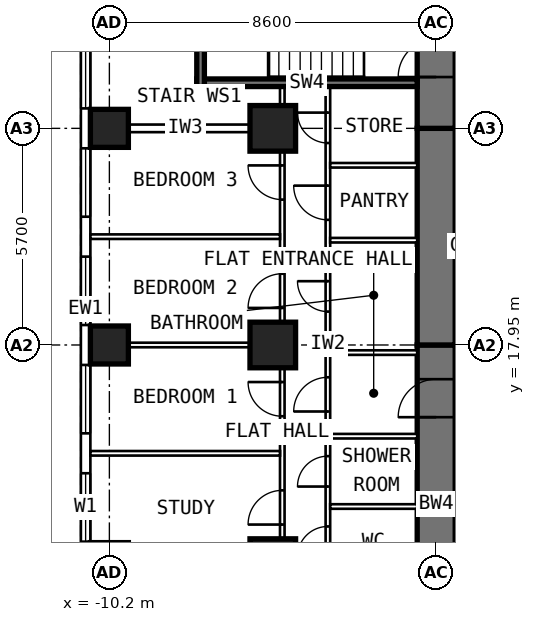
"""IFC4 building model, lengths in metres.
Left out: names, types, materials, properties, quantities, classifications, styles, units other than length and angle.
Written with IfcOpenShell. Run it as: python <this file> out.ifc"""

import sys

from ifc_helpers import new_model, si_unit, direction, frame, frame_2d, origin, origin_2d, place, context, subcontext, project, spatial, rectangle, extrude, element, fill, save


model = new_model("IFC4")
c1 = context("Model", 3, precision=1e-05, world=origin(), true_north=direction((0.0, 1.0)))
c2 = subcontext(c1, "Body", "Model", "MODEL_VIEW")
j1 = project(units=[si_unit("LENGTHUNIT", "METRE"), si_unit("PLANEANGLEUNIT", "RADIAN")], contexts=[c1])
p1 = place(None, origin())
s1 = spatial("IfcSite", under=j1, at=p1, CompositionType="ELEMENT")
p2 = place(p1, origin())
s2 = spatial("IfcBuilding", under=s1, at=p2, CompositionType="ELEMENT")
p3 = place(p2, frame((0.0, 0.0, 68.2)))
s3 = spatial("IfcBuildingStorey", under=s2, at=p3, CompositionType="ELEMENT", Elevation=68.2)
for number, where, z_axis, x_axis in (
    (1, (-10.2, 17.95, 0.0), (0.0, 0.0, 1.0), (0.0, 1.0, 0.0)),
    (2, (-10.2, 23.65, 0.0), (0.0, 0.0, 1.0), (0.0, 1.0, 0.0)),
):
    element("IfcColumn", number, at=place(p3, frame(where, z_axis=z_axis, x_axis=x_axis)), inside=s3, PredefinedType="COLUMN", context=c2, shape_type="SweptSolid", body=[
        extrude(rectangle(XDim=1.0, YDim=1.0, at=origin_2d()), origin(), (0.0, 0.0, 1.0), 3.6),
    ])
for number, where, z_axis, x_axis in (
    (3, (-5.9, 12.25, 0.0), (0.0, 0.0, 1.0), (0.0, 1.0, 0.0)),
    (4, (-5.9, 17.95, 0.0), (0.0, 0.0, 1.0), (0.0, 1.0, 0.0)),
    (5, (-5.9, 23.65, 0.0), (0.0, 0.0, 1.0), (0.0, 1.0, 0.0)),
):
    element("IfcColumn", number, at=place(p3, frame(where, z_axis=z_axis, x_axis=x_axis)), inside=s3, PredefinedType="COLUMN", context=c2, shape_type="SweptSolid", body=[
        extrude(rectangle(XDim=1.2, YDim=1.2, at=origin_2d()), origin(), (0.0, 0.0, 1.0), 3.6),
    ])
p4 = place(p3, frame((-1.6, 9.6, 0.0), z_axis=(0.0, 0.0, 1.0), x_axis=(0.0, 1.0, 0.0)))
e6 = element("IfcWall", 6, at=p4, inside=s3, PredefinedType="SHEAR", context=c2, shape_type="SweptSolid", body=[
    extrude(rectangle(XDim=8.35, YDim=1.0, at=frame_2d((4.175, 0.0))), origin(), (0.0, 0.0, 1.0), 3.6),
])
p5 = place(p4, frame((6.45, 0.0, 0.0)))
e7 = element("IfcOpeningElement", 7, at=p5, cuts=e6, PredefinedType="OPENING", context=c2, shape_type="SweptSolid", body=[
    extrude(rectangle(XDim=1.0, YDim=2.1, at=frame_2d((0.5, 1.05))), frame((0.0, 0.512, 0.0), z_axis=(0.0, -1.0, 0.0), x_axis=(1.0, 0.0, 0.0)), (0.0, 0.0, 1.0), 1.024),
])
p6 = place(p3, frame((-1.6, 17.95, 0.0), z_axis=(0.0, 0.0, 1.0), x_axis=(0.0, 1.0, 0.0)))
e8 = element("IfcWall", 8, at=p6, inside=s3, PredefinedType="SHEAR", context=c2, shape_type="SweptSolid", body=[
    extrude(rectangle(XDim=5.7, YDim=1.0, at=frame_2d((2.85, 0.0))), origin(), (0.0, 0.0, 1.0), 3.6),
])
p7 = place(p3, frame((-1.6, 23.65, 0.0), z_axis=(0.0, 0.0, 1.0), x_axis=(0.0, 1.0, 0.0)))
e9 = element("IfcWall", 9, at=p7, inside=s3, PredefinedType="SHEAR", context=c2, shape_type="SweptSolid", body=[
    extrude(rectangle(XDim=10.745, YDim=1.0, at=frame_2d((5.373, 0.0))), origin(), (0.0, 0.0, 1.0), 3.6),
])
p8 = place(p7, frame((6.1, 0.0, 0.0)))
e10 = element("IfcOpeningElement", 10, at=p8, cuts=e9, PredefinedType="OPENING", context=c2, shape_type="SweptSolid", body=[
    extrude(rectangle(XDim=1.0, YDim=2.1, at=frame_2d((0.5, 1.05))), frame((0.0, 0.512, 0.0), z_axis=(0.0, -1.0, 0.0), x_axis=(1.0, 0.0, 0.0)), (0.0, 0.0, 1.0), 1.024),
])
p9 = place(p7, frame((1.35, 0.0, 0.0)))
e11 = element("IfcOpeningElement", 11, at=p9, cuts=e9, PredefinedType="OPENING", context=c2, shape_type="SweptSolid", body=[
    extrude(rectangle(XDim=1.0, YDim=2.1, at=frame_2d((0.5, 1.05))), frame((0.0, 0.512, 0.0), z_axis=(0.0, -1.0, 0.0), x_axis=(1.0, 0.0, 0.0)), (0.0, 0.0, 1.0), 1.024),
])
p10 = place(p3, frame((-10.825, 6.148, 0.0), z_axis=(0.0, 0.0, 1.0), x_axis=(0.0, 1.0, 0.0)))
e12 = element("IfcWall", 12, at=p10, inside=s3, PredefinedType="SOLIDWALL", context=c2, shape_type="SweptSolid", body=[
    extrude(rectangle(XDim=25.487, YDim=0.25, at=frame_2d((12.744, 0.0))), origin(), (0.0, 0.0, 1.0), 3.35),
])
p11 = place(p10, frame((0.927, 0.0, 0.8)))
e13 = element("IfcOpeningElement", 13, at=p11, cuts=e12, PredefinedType="OPENING", context=c2, shape_type="SweptSolid", body=[
    extrude(rectangle(XDim=1.8, YDim=1.8, at=frame_2d((0.9, 0.9))), frame((0.0, 0.137, 0.0), z_axis=(0.0, -1.0, 0.0), x_axis=(1.0, 0.0, 0.0)), (0.0, 0.0, 1.0), 0.274),
])
p12 = place(p10, frame((3.777, 0.0, 0.8)))
e14 = element("IfcOpeningElement", 14, at=p12, cuts=e12, PredefinedType="OPENING", context=c2, shape_type="SweptSolid", body=[
    extrude(rectangle(XDim=1.8, YDim=1.8, at=frame_2d((0.9, 0.9))), frame((0.0, 0.137, 0.0), z_axis=(0.0, -1.0, 0.0), x_axis=(1.0, 0.0, 0.0)), (0.0, 0.0, 1.0), 0.274),
])
p13 = place(p10, frame((6.627, 0.0, 0.8)))
e15 = element("IfcOpeningElement", 15, at=p13, cuts=e12, PredefinedType="OPENING", context=c2, shape_type="SweptSolid", body=[
    extrude(rectangle(XDim=1.8, YDim=1.8, at=frame_2d((0.9, 0.9))), frame((0.0, 0.137, 0.0), z_axis=(0.0, -1.0, 0.0), x_axis=(1.0, 0.0, 0.0)), (0.0, 0.0, 1.0), 0.274),
])
p14 = place(p10, frame((9.477, 0.0, 0.8)))
e16 = element("IfcOpeningElement", 16, at=p14, cuts=e12, PredefinedType="OPENING", context=c2, shape_type="SweptSolid", body=[
    extrude(rectangle(XDim=1.8, YDim=1.8, at=frame_2d((0.9, 0.9))), frame((0.0, 0.137, 0.0), z_axis=(0.0, -1.0, 0.0), x_axis=(1.0, 0.0, 0.0)), (0.0, 0.0, 1.0), 0.274),
])
p15 = place(p10, frame((12.327, 0.0, 0.8)))
e17 = element("IfcOpeningElement", 17, at=p15, cuts=e12, PredefinedType="OPENING", context=c2, shape_type="SweptSolid", body=[
    extrude(rectangle(XDim=1.8, YDim=1.8, at=frame_2d((0.9, 0.9))), frame((0.0, 0.137, 0.0), z_axis=(0.0, -1.0, 0.0), x_axis=(1.0, 0.0, 0.0)), (0.0, 0.0, 1.0), 0.274),
])
p16 = place(p10, frame((15.177, 0.0, 0.8)))
e18 = element("IfcOpeningElement", 18, at=p16, cuts=e12, PredefinedType="OPENING", context=c2, shape_type="SweptSolid", body=[
    extrude(rectangle(XDim=1.8, YDim=1.8, at=frame_2d((0.9, 0.9))), frame((0.0, 0.137, 0.0), z_axis=(0.0, -1.0, 0.0), x_axis=(1.0, 0.0, 0.0)), (0.0, 0.0, 1.0), 0.274),
])
p17 = place(p10, frame((18.027, 0.0, 0.8)))
e19 = element("IfcOpeningElement", 19, at=p17, cuts=e12, PredefinedType="OPENING", context=c2, shape_type="SweptSolid", body=[
    extrude(rectangle(XDim=1.8, YDim=1.8, at=frame_2d((0.9, 0.9))), frame((0.0, 0.137, 0.0), z_axis=(0.0, -1.0, 0.0), x_axis=(1.0, 0.0, 0.0)), (0.0, 0.0, 1.0), 0.274),
])
p18 = place(p10, frame((20.877, 0.0, 0.8)))
e20 = element("IfcOpeningElement", 20, at=p18, cuts=e12, PredefinedType="OPENING", context=c2, shape_type="SweptSolid", body=[
    extrude(rectangle(XDim=1.8, YDim=1.8, at=frame_2d((0.9, 0.9))), frame((0.0, 0.137, 0.0), z_axis=(0.0, -1.0, 0.0), x_axis=(1.0, 0.0, 0.0)), (0.0, 0.0, 1.0), 0.274),
])
p19 = place(p3, frame((-4.45, 10.1, 0.0), z_axis=(0.0, 0.0, 1.0), x_axis=(0.0, 1.0, 0.0)))
e21 = element("IfcWall", 21, at=p19, inside=s3, PredefinedType="PARTITIONING", context=c2, shape_type="SweptSolid", body=[
    extrude(rectangle(XDim=14.65, YDim=0.12, at=frame_2d((7.325, 0.0))), origin(), (0.0, 0.0, 1.0), 3.35),
])
p20 = place(p19, frame((0.375, 0.0, 0.0)))
e22 = element("IfcOpeningElement", 22, at=p20, cuts=e21, PredefinedType="OPENING", context=c2, shape_type="SweptSolid", body=[
    extrude(rectangle(XDim=0.9, YDim=2.1, at=frame_2d((0.45, 1.05))), frame((0.0, 0.072, 0.0), z_axis=(0.0, -1.0, 0.0), x_axis=(1.0, 0.0, 0.0)), (0.0, 0.0, 1.0), 0.144),
])
p21 = place(p19, frame((2.275, 0.0, 0.0)))
e23 = element("IfcOpeningElement", 23, at=p21, cuts=e21, PredefinedType="OPENING", context=c2, shape_type="SweptSolid", body=[
    extrude(rectangle(XDim=0.8, YDim=2.1, at=frame_2d((0.4, 1.05))), frame((0.0, 0.072, 0.0), z_axis=(0.0, -1.0, 0.0), x_axis=(1.0, 0.0, 0.0)), (0.0, 0.0, 1.0), 0.144),
])
p22 = place(p19, frame((4.125, 0.0, 0.0)))
e24 = element("IfcOpeningElement", 24, at=p22, cuts=e21, PredefinedType="OPENING", context=c2, shape_type="SweptSolid", body=[
    extrude(rectangle(XDim=0.8, YDim=2.1, at=frame_2d((0.4, 1.05))), frame((0.0, 0.072, 0.0), z_axis=(0.0, -1.0, 0.0), x_axis=(1.0, 0.0, 0.0)), (0.0, 0.0, 1.0), 0.144),
])
p23 = place(p19, frame((6.1, 0.0, 0.0)))
e25 = element("IfcOpeningElement", 25, at=p23, cuts=e21, PredefinedType="OPENING", context=c2, shape_type="SweptSolid", body=[
    extrude(rectangle(XDim=0.9, YDim=2.1, at=frame_2d((0.45, 1.05))), frame((0.0, 0.072, 0.0), z_axis=(0.0, -1.0, 0.0), x_axis=(1.0, 0.0, 0.0)), (0.0, 0.0, 1.0), 0.144),
])
p24 = place(p19, frame((8.729, 0.0, 0.0)))
e26 = element("IfcOpeningElement", 26, at=p24, cuts=e21, PredefinedType="OPENING", context=c2, shape_type="SweptSolid", body=[
    extrude(rectangle(XDim=0.8, YDim=2.1, at=frame_2d((0.4, 1.05))), frame((0.0, 0.072, 0.0), z_axis=(0.0, -1.0, 0.0), x_axis=(1.0, 0.0, 0.0)), (0.0, 0.0, 1.0), 0.144),
])
p25 = place(p19, frame((11.143, 0.0, 0.0)))
e27 = element("IfcOpeningElement", 27, at=p25, cuts=e21, PredefinedType="OPENING", context=c2, shape_type="SweptSolid", body=[
    extrude(rectangle(XDim=0.9, YDim=2.1, at=frame_2d((0.45, 1.05))), frame((0.0, 0.072, 0.0), z_axis=(0.0, -1.0, 0.0), x_axis=(1.0, 0.0, 0.0)), (0.0, 0.0, 1.0), 0.144),
])
p26 = place(p19, frame((13.164, 0.0, 0.0)))
e28 = element("IfcOpeningElement", 28, at=p26, cuts=e21, PredefinedType="OPENING", context=c2, shape_type="SweptSolid", body=[
    extrude(rectangle(XDim=0.8, YDim=2.1, at=frame_2d((0.4, 1.05))), frame((0.0, 0.072, 0.0), z_axis=(0.0, -1.0, 0.0), x_axis=(1.0, 0.0, 0.0)), (0.0, 0.0, 1.0), 0.144),
])
p27 = place(p3, frame((-5.65, 9.6, 0.0), z_axis=(0.0, 0.0, 1.0), x_axis=(0.0, 1.0, 0.0)))
e29 = element("IfcWall", 29, at=p27, inside=s3, PredefinedType="PARTITIONING", context=c2, shape_type="SweptSolid", body=[
    extrude(rectangle(XDim=15.15, YDim=0.12, at=frame_2d((7.575, 0.0))), origin(), (0.0, 0.0, 1.0), 3.35),
])
p28 = place(p27, frame((1.0, 0.0, 0.0)))
e30 = element("IfcOpeningElement", 30, at=p28, cuts=e29, PredefinedType="OPENING", context=c2, shape_type="SweptSolid", body=[
    extrude(rectangle(XDim=0.9, YDim=2.1, at=frame_2d((0.45, 1.05))), frame((0.0, 0.072, 0.0), z_axis=(0.0, -1.0, 0.0), x_axis=(1.0, 0.0, 0.0)), (0.0, 0.0, 1.0), 0.144),
])
p29 = place(p27, frame((3.625, 0.0, 0.0)))
e31 = element("IfcOpeningElement", 31, at=p29, cuts=e29, PredefinedType="OPENING", context=c2, shape_type="SweptSolid", body=[
    extrude(rectangle(XDim=0.9, YDim=2.1, at=frame_2d((0.45, 1.05))), frame((0.0, 0.072, 0.0), z_axis=(0.0, -1.0, 0.0), x_axis=(1.0, 0.0, 0.0)), (0.0, 0.0, 1.0), 0.144),
])
p30 = place(p27, frame((6.475, 0.0, 0.0)))
e32 = element("IfcOpeningElement", 32, at=p30, cuts=e29, PredefinedType="OPENING", context=c2, shape_type="SweptSolid", body=[
    extrude(rectangle(XDim=0.9, YDim=2.1, at=frame_2d((0.45, 1.05))), frame((0.0, 0.072, 0.0), z_axis=(0.0, -1.0, 0.0), x_axis=(1.0, 0.0, 0.0)), (0.0, 0.0, 1.0), 0.144),
])
p31 = place(p27, frame((9.325, 0.0, 0.0)))
e33 = element("IfcOpeningElement", 33, at=p31, cuts=e29, PredefinedType="OPENING", context=c2, shape_type="SweptSolid", body=[
    extrude(rectangle(XDim=0.9, YDim=2.1, at=frame_2d((0.45, 1.05))), frame((0.0, 0.072, 0.0), z_axis=(0.0, -1.0, 0.0), x_axis=(1.0, 0.0, 0.0)), (0.0, 0.0, 1.0), 0.144),
])
p32 = place(p27, frame((12.175, 0.0, 0.0)))
e34 = element("IfcOpeningElement", 34, at=p32, cuts=e29, PredefinedType="OPENING", context=c2, shape_type="SweptSolid", body=[
    extrude(rectangle(XDim=0.9, YDim=2.1, at=frame_2d((0.45, 1.05))), frame((0.0, 0.072, 0.0), z_axis=(0.0, -1.0, 0.0), x_axis=(1.0, 0.0, 0.0)), (0.0, 0.0, 1.0), 0.144),
])
p33 = place(p3, frame((-5.71, 15.1, 0.0), z_axis=(0.0, 0.0, 1.0), x_axis=(-1.0, 0.0, 0.0)))
e35 = element("IfcWall", 35, at=p33, inside=s3, PredefinedType="PARTITIONING", context=c2, shape_type="SweptSolid", body=[
    extrude(rectangle(XDim=4.99, YDim=0.12, at=frame_2d((2.495, 0.0))), origin(), (0.0, 0.0, 1.0), 3.35),
])
p34 = place(p3, frame((-5.71, 17.95, 0.0), z_axis=(0.0, 0.0, 1.0), x_axis=(-1.0, 0.0, 0.0)))
e36 = element("IfcWall", 36, at=p34, inside=s3, PredefinedType="PARTITIONING", context=c2, shape_type="SweptSolid", body=[
    extrude(rectangle(XDim=4.99, YDim=0.12, at=frame_2d((2.495, 0.0))), origin(), (0.0, 0.0, 1.0), 2.45),
])
p35 = place(p3, frame((-5.71, 20.8, 0.0), z_axis=(0.0, 0.0, 1.0), x_axis=(-1.0, 0.0, 0.0)))
e37 = element("IfcWall", 37, at=p35, inside=s3, PredefinedType="PARTITIONING", context=c2, shape_type="SweptSolid", body=[
    extrude(rectangle(XDim=4.99, YDim=0.12, at=frame_2d((2.495, 0.0))), origin(), (0.0, 0.0, 1.0), 3.35),
])
for number, where, z_axis, x_axis in (
    (38, (-2.1, 13.7, 0.0), (0.0, 0.0, 1.0), (-1.0, 0.0, 0.0)),
    (39, (-2.1, 15.55, 0.0), (0.0, 0.0, 1.0), (-1.0, 0.0, 0.0)),
):
    element("IfcWall", number, at=place(p3, frame(where, z_axis=z_axis, x_axis=x_axis)), inside=s3, PredefinedType="PARTITIONING", context=c2, shape_type="SweptSolid", body=[
        extrude(rectangle(XDim=2.29, YDim=0.12, at=frame_2d((1.145, 0.0))), origin(), (0.0, 0.0, 1.0), 3.35),
    ])
p36 = place(p3, frame((-2.1, 17.75, 0.0), z_axis=(0.0, 0.0, 1.0), x_axis=(-1.0, 0.0, 0.0)))
e40 = element("IfcWall", 40, at=p36, inside=s3, PredefinedType="PARTITIONING", context=c2, shape_type="SweptSolid", body=[
    extrude(rectangle(XDim=2.29, YDim=0.12, at=frame_2d((1.145, 0.0))), origin(), (0.0, 0.0, 1.0), 2.45),
])
for number, where, z_axis, x_axis in (
    (41, (-2.1, 20.707, 0.0), (0.0, 0.0, 1.0), (-1.0, 0.0, 0.0)),
    (42, (-2.1, 22.678, 0.0), (0.0, 0.0, 1.0), (-1.0, 0.0, 0.0)),
):
    element("IfcWall", number, at=place(p3, frame(where, z_axis=z_axis, x_axis=x_axis)), inside=s3, PredefinedType="PARTITIONING", context=c2, shape_type="SweptSolid", body=[
        extrude(rectangle(XDim=2.29, YDim=0.12, at=frame_2d((1.145, 0.0))), origin(), (0.0, 0.0, 1.0), 3.35),
    ])
p37 = place(p3, frame((-5.71, 23.65, 0.0), z_axis=(0.0, 0.0, 1.0), x_axis=(-1.0, 0.0, 0.0)))
e43 = element("IfcWall", 43, at=p37, inside=s3, PredefinedType="PARTITIONING", context=c2, shape_type="SweptSolid", body=[
    extrude(rectangle(XDim=4.99, YDim=0.2, at=frame_2d((2.495, 0.0))), origin(), (0.0, 0.0, 1.0), 2.45),
])
p38 = place(p3, frame((-2.1, 24.85, 0.0), z_axis=(0.0, 0.0, 1.0), x_axis=(-1.0, 0.0, 0.0)))
e44 = element("IfcWall", 44, at=p38, inside=s3, PredefinedType="SHEAR", context=c2, shape_type="SweptSolid", body=[
    extrude(rectangle(XDim=5.8, YDim=0.2, at=frame_2d((2.9, 0.0))), origin(), (0.0, 0.0, 1.0), 3.33),
])
p39 = place(p3, frame((-7.8, 24.75, 0.0), z_axis=(0.0, 0.0, 1.0), x_axis=(0.0, 1.0, 0.0)))
e45 = element("IfcWall", 45, at=p39, inside=s3, PredefinedType="SHEAR", context=c2, shape_type="SweptSolid", body=[
    extrude(rectangle(XDim=4.0, YDim=0.2, at=frame_2d((2.0, 0.0))), origin(), (0.0, 0.0, 1.0), 3.33),
])
p40 = place(p13, origin())
e46 = element("IfcWindow", 46, at=p40, inside=s3, PartitioningType="SINGLE_PANEL", PredefinedType="WINDOW", context=c2, shape_type="SweptSolid", body=[
    extrude(rectangle(XDim=1.8, YDim=1.8, at=frame_2d((0.9, 0.9))), frame((0.0, 0.03, 0.0), z_axis=(0.0, -1.0, 0.0), x_axis=(1.0, 0.0, 0.0)), (0.0, 0.0, 1.0), 0.06),
])
fill(e15, e46)
p41 = place(p14, origin())
e47 = element("IfcWindow", 47, at=p41, inside=s3, PartitioningType="SINGLE_PANEL", PredefinedType="WINDOW", context=c2, shape_type="SweptSolid", body=[
    extrude(rectangle(XDim=1.8, YDim=1.8, at=frame_2d((0.9, 0.9))), frame((0.0, 0.03, 0.0), z_axis=(0.0, -1.0, 0.0), x_axis=(1.0, 0.0, 0.0)), (0.0, 0.0, 1.0), 0.06),
])
fill(e16, e47)
p42 = place(p15, origin())
e48 = element("IfcWindow", 48, at=p42, inside=s3, PartitioningType="SINGLE_PANEL", PredefinedType="WINDOW", context=c2, shape_type="SweptSolid", body=[
    extrude(rectangle(XDim=1.8, YDim=1.8, at=frame_2d((0.9, 0.9))), frame((0.0, 0.03, 0.0), z_axis=(0.0, -1.0, 0.0), x_axis=(1.0, 0.0, 0.0)), (0.0, 0.0, 1.0), 0.06),
])
fill(e17, e48)
p43 = place(p16, origin())
e49 = element("IfcWindow", 49, at=p43, inside=s3, PartitioningType="SINGLE_PANEL", PredefinedType="WINDOW", context=c2, shape_type="SweptSolid", body=[
    extrude(rectangle(XDim=1.8, YDim=1.8, at=frame_2d((0.9, 0.9))), frame((0.0, 0.03, 0.0), z_axis=(0.0, -1.0, 0.0), x_axis=(1.0, 0.0, 0.0)), (0.0, 0.0, 1.0), 0.06),
])
fill(e18, e49)
p44 = place(p17, origin())
e50 = element("IfcWindow", 50, at=p44, inside=s3, PartitioningType="SINGLE_PANEL", PredefinedType="WINDOW", context=c2, shape_type="SweptSolid", body=[
    extrude(rectangle(XDim=1.8, YDim=1.8, at=frame_2d((0.9, 0.9))), frame((0.0, 0.03, 0.0), z_axis=(0.0, -1.0, 0.0), x_axis=(1.0, 0.0, 0.0)), (0.0, 0.0, 1.0), 0.06),
])
fill(e19, e50)
p45 = place(p5, origin())
e51 = element("IfcDoor", 51, at=p45, inside=s3, OperationType="SINGLE_SWING_LEFT", PredefinedType="DOOR", context=c2, shape_type="SweptSolid", body=[
    extrude(rectangle(XDim=1.0, YDim=2.1, at=frame_2d((0.5, 1.05))), frame((0.0, 0.25, 0.0), z_axis=(0.0, -1.0, 0.0), x_axis=(1.0, 0.0, 0.0)), (0.0, 0.0, 1.0), 0.5),
])
fill(e7, e51)
p46 = place(p29, origin())
e52 = element("IfcDoor", 52, at=p46, inside=s3, OperationType="SINGLE_SWING_LEFT", PredefinedType="DOOR", context=c2, shape_type="SweptSolid", body=[
    extrude(rectangle(XDim=0.9, YDim=2.1, at=frame_2d((0.45, 1.05))), frame((0.0, 0.025, 0.0), z_axis=(0.0, -1.0, 0.0), x_axis=(1.0, 0.0, 0.0)), (0.0, 0.0, 1.0), 0.05),
])
fill(e31, e52)
p47 = place(p30, origin())
e53 = element("IfcDoor", 53, at=p47, inside=s3, OperationType="SINGLE_SWING_RIGHT", PredefinedType="DOOR", context=c2, shape_type="SweptSolid", body=[
    extrude(rectangle(XDim=0.9, YDim=2.1, at=frame_2d((0.45, 1.05))), frame((0.0, 0.025, 0.0), z_axis=(0.0, -1.0, 0.0), x_axis=(1.0, 0.0, 0.0)), (0.0, 0.0, 1.0), 0.05),
])
fill(e32, e53)
p48 = place(p31, origin())
e54 = element("IfcDoor", 54, at=p48, inside=s3, OperationType="SINGLE_SWING_LEFT", PredefinedType="DOOR", context=c2, shape_type="SweptSolid", body=[
    extrude(rectangle(XDim=0.9, YDim=2.1, at=frame_2d((0.45, 1.05))), frame((0.0, 0.025, 0.0), z_axis=(0.0, -1.0, 0.0), x_axis=(1.0, 0.0, 0.0)), (0.0, 0.0, 1.0), 0.05),
])
fill(e33, e54)
p49 = place(p32, origin())
e55 = element("IfcDoor", 55, at=p49, inside=s3, OperationType="SINGLE_SWING_RIGHT", PredefinedType="DOOR", context=c2, shape_type="SweptSolid", body=[
    extrude(rectangle(XDim=0.9, YDim=2.1, at=frame_2d((0.45, 1.05))), frame((0.0, 0.025, 0.0), z_axis=(0.0, -1.0, 0.0), x_axis=(1.0, 0.0, 0.0)), (0.0, 0.0, 1.0), 0.05),
])
fill(e34, e55)
p50 = place(p21, origin())
e56 = element("IfcDoor", 56, at=p50, inside=s3, OperationType="SINGLE_SWING_LEFT", PredefinedType="DOOR", context=c2, shape_type="SweptSolid", body=[
    extrude(rectangle(XDim=0.8, YDim=2.1, at=frame_2d((0.4, 1.05))), frame((0.0, 0.025, 0.0), z_axis=(0.0, -1.0, 0.0), x_axis=(1.0, 0.0, 0.0)), (0.0, 0.0, 1.0), 0.05),
])
fill(e23, e56)
p51 = place(p22, origin())
e57 = element("IfcDoor", 57, at=p51, inside=s3, OperationType="SINGLE_SWING_LEFT", PredefinedType="DOOR", context=c2, shape_type="SweptSolid", body=[
    extrude(rectangle(XDim=0.8, YDim=2.1, at=frame_2d((0.4, 1.05))), frame((0.0, 0.025, 0.0), z_axis=(0.0, -1.0, 0.0), x_axis=(1.0, 0.0, 0.0)), (0.0, 0.0, 1.0), 0.05),
])
fill(e24, e57)
p52 = place(p23, origin())
e58 = element("IfcDoor", 58, at=p52, inside=s3, OperationType="SINGLE_SWING_LEFT", PredefinedType="DOOR", context=c2, shape_type="SweptSolid", body=[
    extrude(rectangle(XDim=0.9, YDim=2.1, at=frame_2d((0.45, 1.05))), frame((0.0, 0.025, 0.0), z_axis=(0.0, -1.0, 0.0), x_axis=(1.0, 0.0, 0.0)), (0.0, 0.0, 1.0), 0.05),
])
fill(e25, e58)
p53 = place(p24, origin())
e59 = element("IfcDoor", 59, at=p53, inside=s3, OperationType="SINGLE_SWING_RIGHT", PredefinedType="DOOR", context=c2, shape_type="SweptSolid", body=[
    extrude(rectangle(XDim=0.8, YDim=2.1, at=frame_2d((0.4, 1.05))), frame((0.0, 0.025, 0.0), z_axis=(0.0, -1.0, 0.0), x_axis=(1.0, 0.0, 0.0)), (0.0, 0.0, 1.0), 0.05),
])
fill(e26, e59)
p54 = place(p25, origin())
e60 = element("IfcDoor", 60, at=p54, inside=s3, OperationType="SINGLE_SWING_RIGHT", PredefinedType="DOOR", context=c2, shape_type="SweptSolid", body=[
    extrude(rectangle(XDim=0.9, YDim=2.1, at=frame_2d((0.45, 1.05))), frame((0.0, 0.025, 0.0), z_axis=(0.0, -1.0, 0.0), x_axis=(1.0, 0.0, 0.0)), (0.0, 0.0, 1.0), 0.05),
])
fill(e27, e60)
p55 = place(p26, origin())
e61 = element("IfcDoor", 61, at=p55, inside=s3, OperationType="SINGLE_SWING_RIGHT", PredefinedType="DOOR", context=c2, shape_type="SweptSolid", body=[
    extrude(rectangle(XDim=0.8, YDim=2.1, at=frame_2d((0.4, 1.05))), frame((0.0, 0.025, 0.0), z_axis=(0.0, -1.0, 0.0), x_axis=(1.0, 0.0, 0.0)), (0.0, 0.0, 1.0), 0.05),
])
fill(e28, e61)
p56 = place(p9, origin())
e62 = element("IfcDoor", 62, at=p56, inside=s3, OperationType="SINGLE_SWING_LEFT", PredefinedType="DOOR", context=c2, shape_type="SweptSolid", body=[
    extrude(rectangle(XDim=1.0, YDim=2.1, at=frame_2d((0.5, 1.05))), frame((0.0, 0.25, 0.0), z_axis=(0.0, -1.0, 0.0), x_axis=(1.0, 0.0, 0.0)), (0.0, 0.0, 1.0), 0.5),
])
fill(e11, e62)
save(model, sys.argv[1])
